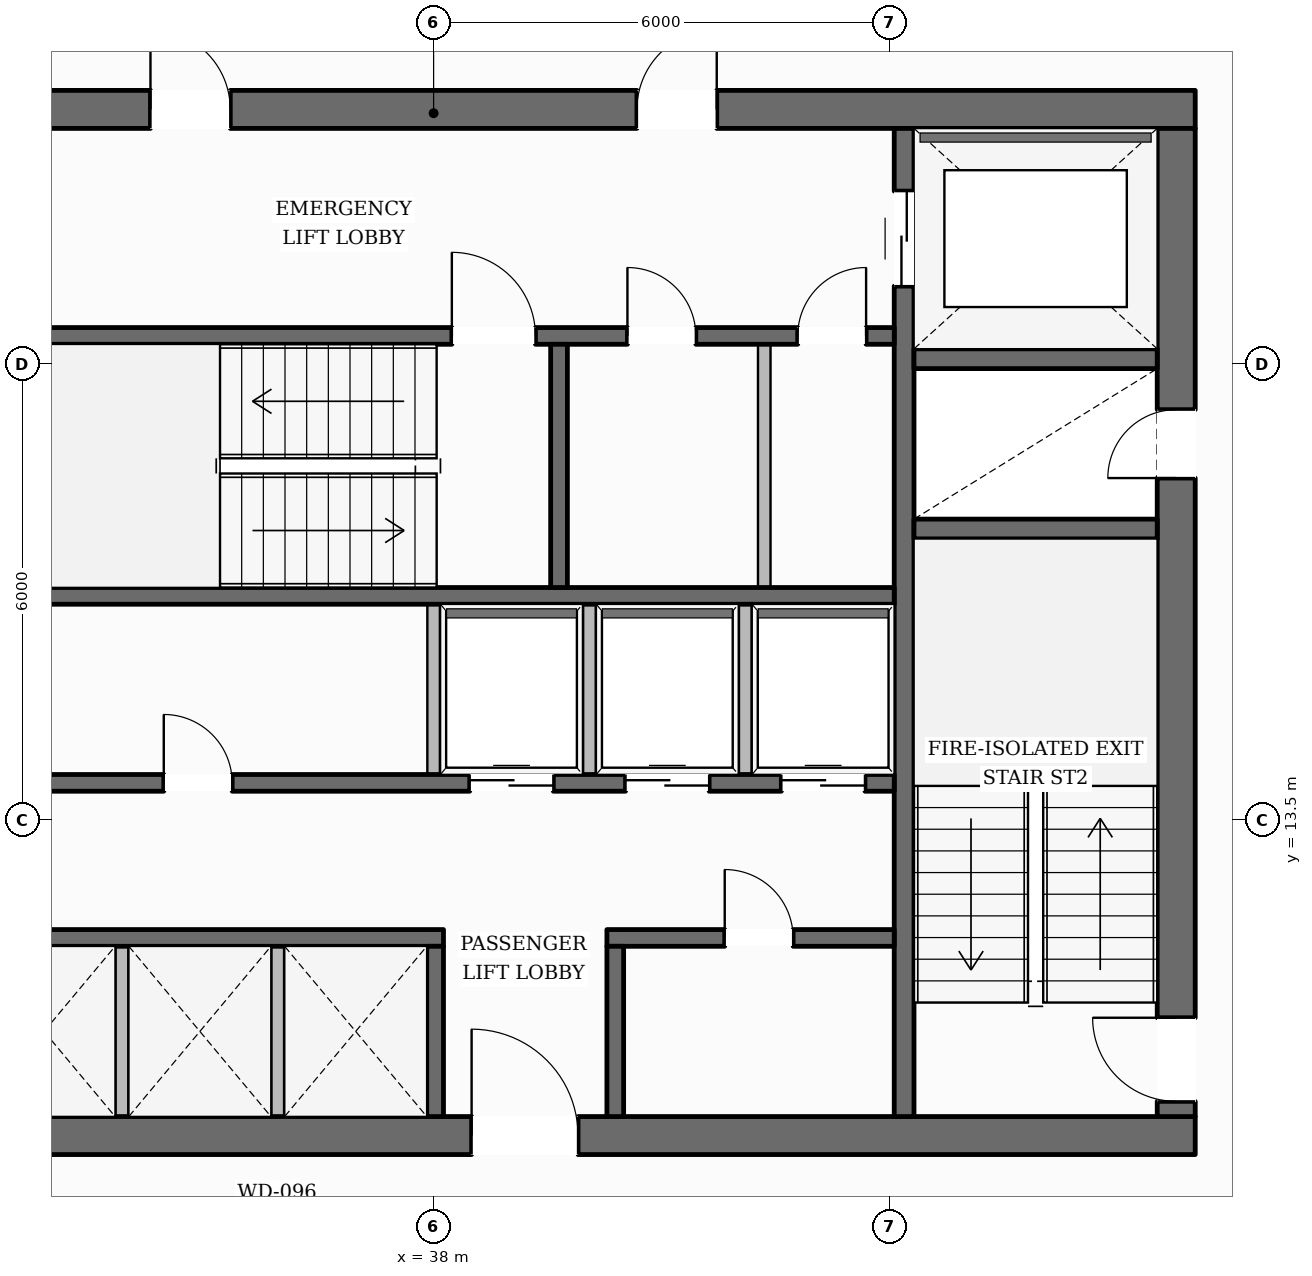
"""IFC4 building model, lengths in metres.
Left out: names, types, materials, properties, quantities, classifications, styles, units other than length and angle.
Written with IfcOpenShell. Run it as: python <this file> out.ifc"""

import sys

from ifc_helpers import new_model, si_unit, direction, frame, frame_2d, origin, place, context, subcontext, project, spatial, rectangle, extrude, element, fill, save


model = new_model("IFC4")
c1 = context("Model", 3, precision=1e-05, world=origin(), true_north=direction((0.0, 1.0)))
c2 = subcontext(c1, "Body", "Model", "MODEL_VIEW")
j1 = project(units=[si_unit("LENGTHUNIT", "METRE"), si_unit("PLANEANGLEUNIT", "RADIAN")], contexts=[c1])
p1 = place(None, origin())
s1 = spatial("IfcSite", under=j1, at=p1, CompositionType="ELEMENT")
p2 = place(p1, origin())
s2 = spatial("IfcBuilding", under=s1, at=p2, CompositionType="ELEMENT")
p3 = place(p2, frame((0.0, 0.0, 97.05)))
s3 = spatial("IfcBuildingStorey", under=s2, at=p3, CompositionType="ELEMENT", Elevation=97.05)
p4 = place(p3, frame((27.98, 9.35, 0.0), z_axis=(0.0, 0.0, 1.0), x_axis=(1.0, 0.0, 0.0)))
e1 = element("IfcWall", 1, at=p4, inside=s3, PredefinedType="SOLIDWALL", context=c2, shape_type="SweptSolid", body=[
    extrude(rectangle(XDim=20.04, YDim=0.5, at=frame_2d((10.02, 0.0))), origin(), (0.0, 0.0, 1.0), 3.6),
])
p5 = place(p4, frame((10.52, 0.0, 0.0)))
e2 = element("IfcOpeningElement", 2, at=p5, cuts=e1, PredefinedType="OPENING", context=c2, shape_type="SweptSolid", body=[
    extrude(rectangle(XDim=1.4, YDim=2.2, at=frame_2d((0.7, 1.1))), frame((0.0, 0.26, 0.0), z_axis=(0.0, -1.0, 0.0), x_axis=(1.0, 0.0, 0.0)), (0.0, 0.0, 1.0), 0.52),
])
p6 = place(p3, frame((27.98, 22.85, 0.0), z_axis=(0.0, 0.0, 1.0), x_axis=(1.0, 0.0, 0.0)))
e3 = element("IfcWall", 3, at=p6, inside=s3, PredefinedType="SOLIDWALL", context=c2, shape_type="SweptSolid", body=[
    extrude(rectangle(XDim=20.04, YDim=0.5, at=frame_2d((10.02, 0.0))), origin(), (0.0, 0.0, 1.0), 3.6),
])
p7 = place(p6, frame((6.295, 0.0, 0.0)))
e4 = element("IfcOpeningElement", 4, at=p7, cuts=e3, PredefinedType="OPENING", context=c2, shape_type="SweptSolid", body=[
    extrude(rectangle(XDim=1.05, YDim=2.15, at=frame_2d((0.525, 1.075))), frame((0.0, 0.26, 0.0), z_axis=(0.0, -1.0, 0.0), x_axis=(1.0, 0.0, 0.0)), (0.0, 0.0, 1.0), 0.52),
])
p8 = place(p6, frame((12.695, 0.0, 0.0)))
e5 = element("IfcOpeningElement", 5, at=p8, cuts=e3, PredefinedType="OPENING", context=c2, shape_type="SweptSolid", body=[
    extrude(rectangle(XDim=1.05, YDim=2.15, at=frame_2d((0.525, 1.075))), frame((0.0, 0.26, 0.0), z_axis=(0.0, -1.0, 0.0), x_axis=(1.0, 0.0, 0.0)), (0.0, 0.0, 1.0), 0.52),
])
p9 = place(p3, frame((47.77, 9.6, 0.0), z_axis=(0.0, 0.0, 1.0), x_axis=(0.0, 1.0, 0.0)))
e6 = element("IfcWall", 6, at=p9, inside=s3, PredefinedType="SOLIDWALL", context=c2, shape_type="SweptSolid", body=[
    extrude(rectangle(XDim=13.0, YDim=0.5, at=frame_2d((6.5, 0.0))), origin(), (0.0, 0.0, 1.0), 3.6),
])
p10 = place(p9, frame((0.2, 0.0, 0.0)))
e7 = element("IfcOpeningElement", 7, at=p10, cuts=e6, PredefinedType="OPENING", context=c2, shape_type="SweptSolid", body=[
    extrude(rectangle(XDim=1.1, YDim=2.15, at=frame_2d((0.55, 1.075))), frame((0.0, 0.26, 0.0), z_axis=(0.0, -1.0, 0.0), x_axis=(1.0, 0.0, 0.0)), (0.0, 0.0, 1.0), 0.52),
])
p11 = place(p9, frame((8.4, 0.0, 0.0)))
e8 = element("IfcOpeningElement", 8, at=p11, cuts=e6, PredefinedType="OPENING", context=c2, shape_type="SweptSolid", body=[
    extrude(rectangle(XDim=0.9, YDim=2.1, at=frame_2d((0.45, 1.05))), frame((0.0, 0.26, 0.0), z_axis=(0.0, -1.0, 0.0), x_axis=(1.0, 0.0, 0.0)), (0.0, 0.0, 1.0), 0.52),
])
p12 = place(p3, frame((44.19, 9.6, 0.0), z_axis=(0.0, 0.0, 1.0), x_axis=(0.0, 1.0, 0.0)))
e9 = element("IfcWall", 9, at=p12, inside=s3, PredefinedType="SHEAR", context=c2, shape_type="SweptSolid", body=[
    extrude(rectangle(XDim=13.0, YDim=0.26, at=frame_2d((6.5, 0.0))), origin(), (0.0, 0.0, 1.0), 3.6),
])
p13 = place(p12, frame((10.925, 0.0, 0.0)))
e10 = element("IfcOpeningElement", 10, at=p13, cuts=e9, PredefinedType="OPENING", context=c2, shape_type="SweptSolid", body=[
    extrude(rectangle(XDim=1.25, YDim=2.25, at=frame_2d((0.625, 1.125))), frame((0.0, 0.14, 0.0), z_axis=(0.0, -1.0, 0.0), x_axis=(1.0, 0.0, 0.0)), (0.0, 0.0, 1.0), 0.28),
])
for number, where, z_axis, x_axis in (
    (11, (44.32, 17.33, 0.0), (0.0, 0.0, 1.0), (1.0, 0.0, 0.0)),
    (12, (44.32, 19.57, 0.0), (0.0, 0.0, 1.0), (1.0, 0.0, 0.0)),
):
    element("IfcWall", number, at=place(p3, frame(where, z_axis=z_axis, x_axis=x_axis)), inside=s3, PredefinedType="SHEAR", context=c2, shape_type="SweptSolid", body=[
        extrude(rectangle(XDim=3.2, YDim=0.26, at=frame_2d((1.6, 0.0))), origin(), (0.0, 0.0, 1.0), 3.6),
    ])
p14 = place(p3, frame((31.94, 19.87, 0.0), z_axis=(0.0, 0.0, 1.0), x_axis=(1.0, 0.0, 0.0)))
e13 = element("IfcWall", 13, at=p14, inside=s3, PredefinedType="SOLIDWALL", context=c2, shape_type="SweptSolid", body=[
    extrude(rectangle(XDim=12.12, YDim=0.22, at=frame_2d((6.06, 0.0))), origin(), (0.0, 0.0, 1.0), 3.6),
])
p15 = place(p14, frame((6.3, 0.0, 0.0)))
e14 = element("IfcOpeningElement", 14, at=p15, cuts=e13, PredefinedType="OPENING", context=c2, shape_type="SweptSolid", body=[
    extrude(rectangle(XDim=1.1, YDim=2.15, at=frame_2d((0.55, 1.075))), frame((0.0, 0.12, 0.0), z_axis=(0.0, -1.0, 0.0), x_axis=(1.0, 0.0, 0.0)), (0.0, 0.0, 1.0), 0.24),
])
p16 = place(p14, frame((8.61, 0.0, 0.0)))
e15 = element("IfcOpeningElement", 15, at=p16, cuts=e13, PredefinedType="OPENING", context=c2, shape_type="SweptSolid", body=[
    extrude(rectangle(XDim=0.9, YDim=2.1, at=frame_2d((0.45, 1.05))), frame((0.0, 0.12, 0.0), z_axis=(0.0, -1.0, 0.0), x_axis=(1.0, 0.0, 0.0)), (0.0, 0.0, 1.0), 0.24),
])
p17 = place(p14, frame((10.85, 0.0, 0.0)))
e16 = element("IfcOpeningElement", 16, at=p17, cuts=e13, PredefinedType="OPENING", context=c2, shape_type="SweptSolid", body=[
    extrude(rectangle(XDim=0.9, YDim=2.1, at=frame_2d((0.45, 1.05))), frame((0.0, 0.12, 0.0), z_axis=(0.0, -1.0, 0.0), x_axis=(1.0, 0.0, 0.0)), (0.0, 0.0, 1.0), 0.24),
])
p18 = place(p3, frame((31.94, 16.45, 0.0), z_axis=(0.0, 0.0, 1.0), x_axis=(1.0, 0.0, 0.0)))
e17 = element("IfcWall", 17, at=p18, inside=s3, PredefinedType="SOLIDWALL", context=c2, shape_type="SweptSolid", body=[
    extrude(rectangle(XDim=12.12, YDim=0.22, at=frame_2d((6.06, 0.0))), origin(), (0.0, 0.0, 1.0), 3.6),
])
p19 = place(p3, frame((39.65, 16.56, 0.0), z_axis=(0.0, 0.0, 1.0), x_axis=(0.0, 1.0, 0.0)))
e18 = element("IfcWall", 18, at=p19, inside=s3, PredefinedType="SOLIDWALL", context=c2, shape_type="SweptSolid", body=[
    extrude(rectangle(XDim=3.2, YDim=0.22, at=frame_2d((1.6, 0.0))), origin(), (0.0, 0.0, 1.0), 3.6),
])
p20 = place(p3, frame((31.94, 13.99, 0.0), z_axis=(0.0, 0.0, 1.0), x_axis=(1.0, 0.0, 0.0)))
e19 = element("IfcWall", 19, at=p20, inside=s3, PredefinedType="SOLIDWALL", context=c2, shape_type="SweptSolid", body=[
    extrude(rectangle(XDim=12.12, YDim=0.22, at=frame_2d((6.06, 0.0))), origin(), (0.0, 0.0, 1.0), 3.6),
])
p21 = place(p20, frame((2.51, 0.0, 0.0)))
e20 = element("IfcOpeningElement", 20, at=p21, cuts=e19, PredefinedType="OPENING", context=c2, shape_type="SweptSolid", body=[
    extrude(rectangle(XDim=0.9, YDim=2.1, at=frame_2d((0.45, 1.05))), frame((0.0, 0.12, 0.0), z_axis=(0.0, -1.0, 0.0), x_axis=(1.0, 0.0, 0.0)), (0.0, 0.0, 1.0), 0.24),
])
p22 = place(p20, frame((6.535, 0.0, 0.0)))
e21 = element("IfcOpeningElement", 21, at=p22, cuts=e19, PredefinedType="OPENING", context=c2, shape_type="SweptSolid", body=[
    extrude(rectangle(XDim=1.1, YDim=2.2, at=frame_2d((0.55, 1.1))), frame((0.0, 0.12, 0.0), z_axis=(0.0, -1.0, 0.0), x_axis=(1.0, 0.0, 0.0)), (0.0, 0.0, 1.0), 0.24),
])
p23 = place(p20, frame((8.585, 0.0, 0.0)))
e22 = element("IfcOpeningElement", 22, at=p23, cuts=e19, PredefinedType="OPENING", context=c2, shape_type="SweptSolid", body=[
    extrude(rectangle(XDim=1.1, YDim=2.2, at=frame_2d((0.55, 1.1))), frame((0.0, 0.12, 0.0), z_axis=(0.0, -1.0, 0.0), x_axis=(1.0, 0.0, 0.0)), (0.0, 0.0, 1.0), 0.24),
])
p24 = place(p20, frame((10.635, 0.0, 0.0)))
e23 = element("IfcOpeningElement", 23, at=p24, cuts=e19, PredefinedType="OPENING", context=c2, shape_type="SweptSolid", body=[
    extrude(rectangle(XDim=1.1, YDim=2.2, at=frame_2d((0.55, 1.1))), frame((0.0, 0.12, 0.0), z_axis=(0.0, -1.0, 0.0), x_axis=(1.0, 0.0, 0.0)), (0.0, 0.0, 1.0), 0.24),
])
p25 = place(p3, frame((31.94, 11.95, 0.0), z_axis=(0.0, 0.0, 1.0), x_axis=(1.0, 0.0, 0.0)))
e24 = element("IfcWall", 24, at=p25, inside=s3, PredefinedType="SOLIDWALL", context=c2, shape_type="SweptSolid", body=[
    extrude(rectangle(XDim=6.19, YDim=0.22, at=frame_2d((3.095, 0.0))), origin(), (0.0, 0.0, 1.0), 3.6),
])
p26 = place(p3, frame((40.28, 11.95, 0.0), z_axis=(0.0, 0.0, 1.0), x_axis=(1.0, 0.0, 0.0)))
e25 = element("IfcWall", 25, at=p26, inside=s3, PredefinedType="SOLIDWALL", context=c2, shape_type="SweptSolid", body=[
    extrude(rectangle(XDim=3.78, YDim=0.22, at=frame_2d((1.89, 0.0))), origin(), (0.0, 0.0, 1.0), 3.6),
])
p27 = place(p26, frame((1.55, 0.0, 0.0)))
e26 = element("IfcOpeningElement", 26, at=p27, cuts=e25, PredefinedType="OPENING", context=c2, shape_type="SweptSolid", body=[
    extrude(rectangle(XDim=0.9, YDim=2.1, at=frame_2d((0.45, 1.05))), frame((0.0, 0.12, 0.0), z_axis=(0.0, -1.0, 0.0), x_axis=(1.0, 0.0, 0.0)), (0.0, 0.0, 1.0), 0.24),
])
for number, where, z_axis, x_axis in (
    (27, (38.02, 9.6, 0.0), (0.0, 0.0, 1.0), (0.0, 1.0, 0.0)),
    (28, (40.39, 9.6, 0.0), (0.0, 0.0, 1.0), (0.0, 1.0, 0.0)),
):
    element("IfcWall", number, at=place(p3, frame(where, z_axis=z_axis, x_axis=x_axis)), inside=s3, PredefinedType="SOLIDWALL", context=c2, shape_type="SweptSolid", body=[
        extrude(rectangle(XDim=2.24, YDim=0.22, at=frame_2d((1.12, 0.0))), origin(), (0.0, 0.0, 1.0), 3.6),
    ])
p28 = place(p3, frame((44.161, 44.724, 0.0), z_axis=(0.0, 0.0, 1.0), x_axis=(0.496205042728, -0.86820536486, 0.0)))
e29 = element("IfcWall", 29, at=p28, inside=s3, PredefinedType="STANDARD", context=c2, shape_type="SweptSolid", body=[
    extrude(rectangle(XDim=36.193, YDim=0.38, at=frame_2d((18.097, 0.0))), origin(), (0.0, 0.0, 1.0), 3.059),
])
p29 = place(p28, frame((32.008, 0.0, 0.65)))
e30 = element("IfcOpeningElement", 30, at=p29, cuts=e29, PredefinedType="OPENING", context=c2, shape_type="SweptSolid", body=[
    extrude(rectangle(XDim=1.55, YDim=1.75, at=frame_2d((0.775, 0.875))), frame((0.0, 0.2, 0.0), z_axis=(0.0, -1.0, 0.0), x_axis=(1.0, 0.0, 0.0)), (0.0, 0.0, 1.0), 0.4),
])
p30 = place(p28, frame((26.134, 0.0, 0.65)))
e31 = element("IfcOpeningElement", 31, at=p30, cuts=e29, PredefinedType="OPENING", context=c2, shape_type="SweptSolid", body=[
    extrude(rectangle(XDim=1.55, YDim=1.75, at=frame_2d((0.775, 0.875))), frame((0.0, 0.2, 0.0), z_axis=(0.0, -1.0, 0.0), x_axis=(1.0, 0.0, 0.0)), (0.0, 0.0, 1.0), 0.4),
])
p31 = place(p28, frame((20.26, 0.0, 0.65)))
e32 = element("IfcOpeningElement", 32, at=p31, cuts=e29, PredefinedType="OPENING", context=c2, shape_type="SweptSolid", body=[
    extrude(rectangle(XDim=1.55, YDim=1.75, at=frame_2d((0.775, 0.875))), frame((0.0, 0.2, 0.0), z_axis=(0.0, -1.0, 0.0), x_axis=(1.0, 0.0, 0.0)), (0.0, 0.0, 1.0), 0.4),
])
p32 = place(p28, frame((8.513, 0.0, 0.65)))
e33 = element("IfcOpeningElement", 33, at=p32, cuts=e29, PredefinedType="OPENING", context=c2, shape_type="SweptSolid", body=[
    extrude(rectangle(XDim=1.55, YDim=1.75, at=frame_2d((0.775, 0.875))), frame((0.0, 0.2, 0.0), z_axis=(0.0, -1.0, 0.0), x_axis=(1.0, 0.0, 0.0)), (0.0, 0.0, 1.0), 0.4),
])
p33 = place(p28, frame((2.639, 0.0, 0.65)))
e34 = element("IfcOpeningElement", 34, at=p33, cuts=e29, PredefinedType="OPENING", context=c2, shape_type="SweptSolid", body=[
    extrude(rectangle(XDim=1.55, YDim=1.75, at=frame_2d((0.775, 0.875))), frame((0.0, 0.2, 0.0), z_axis=(0.0, -1.0, 0.0), x_axis=(1.0, 0.0, 0.0)), (0.0, 0.0, 1.0), 0.4),
])
for number, where, z_axis, x_axis in (
    (35, (33.9, 9.55, 0.0), (0.0, 0.0, 1.0), (0.0, 1.0, 0.0)),
    (36, (35.95, 9.55, 0.0), (0.0, 0.0, 1.0), (0.0, 1.0, 0.0)),
):
    element("IfcWall", number, at=place(p3, frame(where, z_axis=z_axis, x_axis=x_axis)), inside=s3, PredefinedType="PARTITIONING", context=c2, shape_type="SweptSolid", body=[
        extrude(rectangle(XDim=2.29, YDim=0.165, at=frame_2d((1.145, 0.0))), origin(), (0.0, 0.0, 1.0), 3.6),
    ])
for number, where, z_axis, x_axis in (
    (37, (38.0, 14.1, 0.0), (0.0, 0.0, 1.0), (0.0, 1.0, 0.0)),
    (38, (40.05, 14.1, 0.0), (0.0, 0.0, 1.0), (0.0, 1.0, 0.0)),
    (39, (42.1, 14.1, 0.0), (0.0, 0.0, 1.0), (0.0, 1.0, 0.0)),
):
    element("IfcWall", number, at=place(p3, frame(where, z_axis=z_axis, x_axis=x_axis)), inside=s3, PredefinedType="PARTITIONING", context=c2, shape_type="SweptSolid", body=[
        extrude(rectangle(XDim=2.24, YDim=0.165, at=frame_2d((1.12, 0.0))), origin(), (0.0, 0.0, 1.0), 3.6),
    ])
p34 = place(p3, frame((42.35, 16.56, 0.0), z_axis=(0.0, 0.0, 1.0), x_axis=(0.0, 1.0, 0.0)))
e40 = element("IfcWall", 40, at=p34, inside=s3, PredefinedType="PARTITIONING", context=c2, shape_type="SweptSolid", body=[
    extrude(rectangle(XDim=3.2, YDim=0.165, at=frame_2d((1.6, 0.0))), origin(), (0.0, 0.0, 1.0), 3.6),
])
p35 = place(p3, frame((55.191, 23.522, 0.0), z_axis=(0.0, 0.0, 1.0), x_axis=(-0.774294364682, 0.632825597476, 0.0)))
e41 = element("IfcWall", 41, at=p35, inside=s3, PredefinedType="PARTITIONING", context=c2, shape_type="SweptSolid", body=[
    extrude(rectangle(XDim=13.905, YDim=0.125, at=frame_2d((6.952, 0.0))), origin(), (0.0, 0.0, 1.0), 3.288),
])
p36 = place(p35, frame((6.47, 0.0, 0.0)))
e42 = element("IfcOpeningElement", 42, at=p36, cuts=e41, PredefinedType="OPENING", context=c2, shape_type="SweptSolid", body=[
    extrude(rectangle(XDim=0.98, YDim=2.15, at=frame_2d((0.49, 1.075))), frame((0.0, 0.073, 0.0), z_axis=(0.0, -1.0, 0.0), x_axis=(1.0, 0.0, 0.0)), (0.0, 0.0, 1.0), 0.145),
])
p37 = place(p10, origin())
e43 = element("IfcDoor", 43, at=p37, inside=s3, OperationType="SINGLE_SWING_RIGHT", PredefinedType="DOOR", context=c2, shape_type="SweptSolid", body=[
    extrude(rectangle(XDim=1.1, YDim=2.15, at=frame_2d((0.55, 1.075))), frame((0.0, 0.025, 0.0), z_axis=(0.0, -1.0, 0.0), x_axis=(1.0, 0.0, 0.0)), (0.0, 0.0, 1.0), 0.05),
])
fill(e7, e43)
p38 = place(p15, origin())
e44 = element("IfcDoor", 44, at=p38, inside=s3, OperationType="SINGLE_SWING_LEFT", PredefinedType="DOOR", context=c2, shape_type="SweptSolid", body=[
    extrude(rectangle(XDim=1.1, YDim=2.15, at=frame_2d((0.55, 1.075))), frame((0.0, 0.025, 0.0), z_axis=(0.0, -1.0, 0.0), x_axis=(1.0, 0.0, 0.0)), (0.0, 0.0, 1.0), 0.05),
])
fill(e14, e44)
p39 = place(p11, origin())
e45 = element("IfcDoor", 45, at=p39, inside=s3, OperationType="SINGLE_SWING_LEFT", PredefinedType="DOOR", context=c2, shape_type="SweptSolid", body=[
    extrude(rectangle(XDim=0.9, YDim=2.1, at=frame_2d((0.45, 1.05))), frame((0.0, 0.025, 0.0), z_axis=(0.0, -1.0, 0.0), x_axis=(1.0, 0.0, 0.0)), (0.0, 0.0, 1.0), 0.05),
])
fill(e8, e45)
p40 = place(p7, origin())
e46 = element("IfcDoor", 46, at=p40, inside=s3, OperationType="SINGLE_SWING_LEFT", PredefinedType="DOOR", context=c2, shape_type="SweptSolid", body=[
    extrude(rectangle(XDim=1.05, YDim=2.15, at=frame_2d((0.525, 1.075))), frame((0.0, 0.025, 0.0), z_axis=(0.0, -1.0, 0.0), x_axis=(1.0, 0.0, 0.0)), (0.0, 0.0, 1.0), 0.05),
])
fill(e4, e46)
p41 = place(p8, origin())
e47 = element("IfcDoor", 47, at=p41, inside=s3, OperationType="SINGLE_SWING_RIGHT", PredefinedType="DOOR", context=c2, shape_type="SweptSolid", body=[
    extrude(rectangle(XDim=1.05, YDim=2.15, at=frame_2d((0.525, 1.075))), frame((0.0, 0.025, 0.0), z_axis=(0.0, -1.0, 0.0), x_axis=(1.0, 0.0, 0.0)), (0.0, 0.0, 1.0), 0.05),
])
fill(e5, e47)
p42 = place(p13, origin())
e48 = element("IfcDoor", 48, at=p42, inside=s3, OperationType="DOUBLE_DOOR_SLIDING", PredefinedType="DOOR", context=c2, shape_type="SweptSolid", body=[
    extrude(rectangle(XDim=1.25, YDim=2.25, at=frame_2d((0.625, 1.125))), frame((0.0, 0.025, 0.0), z_axis=(0.0, -1.0, 0.0), x_axis=(1.0, 0.0, 0.0)), (0.0, 0.0, 1.0), 0.05),
])
fill(e10, e48)
p43 = place(p5, origin())
e49 = element("IfcDoor", 49, at=p43, inside=s3, OperationType="SINGLE_SWING_LEFT", PredefinedType="DOOR", context=c2, shape_type="SweptSolid", body=[
    extrude(rectangle(XDim=1.4, YDim=2.2, at=frame_2d((0.7, 1.1))), frame((0.0, 0.025, 0.0), z_axis=(0.0, -1.0, 0.0), x_axis=(1.0, 0.0, 0.0)), (0.0, 0.0, 1.0), 0.05),
])
fill(e2, e49)
p44 = place(p21, origin())
e50 = element("IfcDoor", 50, at=p44, inside=s3, OperationType="SINGLE_SWING_LEFT", PredefinedType="DOOR", context=c2, shape_type="SweptSolid", body=[
    extrude(rectangle(XDim=0.9, YDim=2.1, at=frame_2d((0.45, 1.05))), frame((0.0, 0.025, 0.0), z_axis=(0.0, -1.0, 0.0), x_axis=(1.0, 0.0, 0.0)), (0.0, 0.0, 1.0), 0.05),
])
fill(e20, e50)
p45 = place(p22, origin())
e51 = element("IfcDoor", 51, at=p45, inside=s3, OperationType="DOUBLE_DOOR_SLIDING", PredefinedType="DOOR", context=c2, shape_type="SweptSolid", body=[
    extrude(rectangle(XDim=1.1, YDim=2.2, at=frame_2d((0.55, 1.1))), frame((0.0, 0.025, 0.0), z_axis=(0.0, -1.0, 0.0), x_axis=(1.0, 0.0, 0.0)), (0.0, 0.0, 1.0), 0.05),
])
fill(e21, e51)
p46 = place(p23, origin())
e52 = element("IfcDoor", 52, at=p46, inside=s3, OperationType="DOUBLE_DOOR_SLIDING", PredefinedType="DOOR", context=c2, shape_type="SweptSolid", body=[
    extrude(rectangle(XDim=1.1, YDim=2.2, at=frame_2d((0.55, 1.1))), frame((0.0, 0.025, 0.0), z_axis=(0.0, -1.0, 0.0), x_axis=(1.0, 0.0, 0.0)), (0.0, 0.0, 1.0), 0.05),
])
fill(e22, e52)
p47 = place(p24, origin())
e53 = element("IfcDoor", 53, at=p47, inside=s3, OperationType="DOUBLE_DOOR_SLIDING", PredefinedType="DOOR", context=c2, shape_type="SweptSolid", body=[
    extrude(rectangle(XDim=1.1, YDim=2.2, at=frame_2d((0.55, 1.1))), frame((0.0, 0.025, 0.0), z_axis=(0.0, -1.0, 0.0), x_axis=(1.0, 0.0, 0.0)), (0.0, 0.0, 1.0), 0.05),
])
fill(e23, e53)
p48 = place(p16, origin())
e54 = element("IfcDoor", 54, at=p48, inside=s3, OperationType="SINGLE_SWING_LEFT", PredefinedType="DOOR", context=c2, shape_type="SweptSolid", body=[
    extrude(rectangle(XDim=0.9, YDim=2.1, at=frame_2d((0.45, 1.05))), frame((0.0, 0.025, 0.0), z_axis=(0.0, -1.0, 0.0), x_axis=(1.0, 0.0, 0.0)), (0.0, 0.0, 1.0), 0.05),
])
fill(e15, e54)
p49 = place(p17, origin())
e55 = element("IfcDoor", 55, at=p49, inside=s3, OperationType="SINGLE_SWING_RIGHT", PredefinedType="DOOR", context=c2, shape_type="SweptSolid", body=[
    extrude(rectangle(XDim=0.9, YDim=2.1, at=frame_2d((0.45, 1.05))), frame((0.0, 0.025, 0.0), z_axis=(0.0, -1.0, 0.0), x_axis=(1.0, 0.0, 0.0)), (0.0, 0.0, 1.0), 0.05),
])
fill(e16, e55)
p50 = place(p27, origin())
e56 = element("IfcDoor", 56, at=p50, inside=s3, OperationType="SINGLE_SWING_LEFT", PredefinedType="DOOR", context=c2, shape_type="SweptSolid", body=[
    extrude(rectangle(XDim=0.9, YDim=2.1, at=frame_2d((0.45, 1.05))), frame((0.0, 0.025, 0.0), z_axis=(0.0, -1.0, 0.0), x_axis=(1.0, 0.0, 0.0)), (0.0, 0.0, 1.0), 0.05),
])
fill(e26, e56)
save(model, sys.argv[1])
